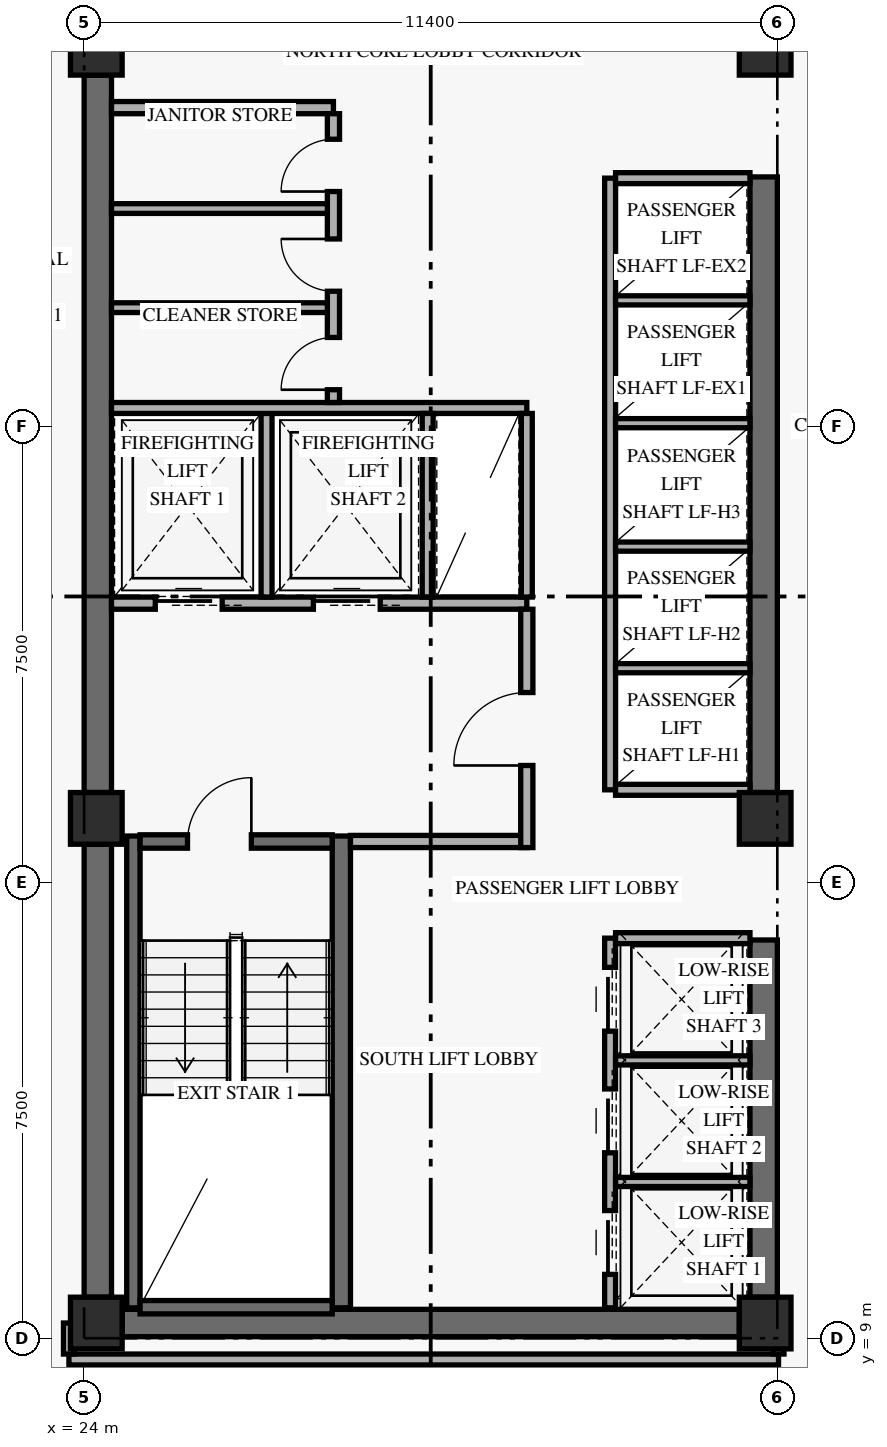
"""IFC4 building model, lengths in metres.
Left out: names, types, materials, properties, quantities, classifications, styles, units other than length and angle.
Written with IfcOpenShell. Run it as: python <this file> out.ifc"""

import sys

from ifc_helpers import new_model, si_unit, direction, frame, frame_2d, origin, origin_2d, place, context, subcontext, project, spatial, rectangle, extrude, element, fill, save


model = new_model("IFC4")
c1 = context("Model", 3, precision=1e-05, world=origin(), true_north=direction((0.0, 1.0)))
c2 = subcontext(c1, "Body", "Model", "MODEL_VIEW")
j1 = project(units=[si_unit("LENGTHUNIT", "METRE"), si_unit("PLANEANGLEUNIT", "RADIAN")], contexts=[c1])
p1 = place(None, origin())
s1 = spatial("IfcSite", under=j1, at=p1, CompositionType="ELEMENT")
p2 = place(p1, origin())
s2 = spatial("IfcBuilding", under=s1, at=p2, CompositionType="ELEMENT")
p3 = place(p2, frame((0.0, 0.0, 80.4)))
s3 = spatial("IfcBuildingStorey", under=s2, at=p3, CompositionType="ELEMENT", Elevation=80.4)
p4 = place(p3, frame((24.225, 9.675, 0.0), z_axis=(0.0, 0.0, 1.0), x_axis=(0.0, 1.0, 0.0)))
e1 = element("IfcWall", 1, at=p4, inside=s3, PredefinedType="SHEAR", context=c2, shape_type="SweptSolid", body=[
    extrude(rectangle(XDim=7.45, YDim=0.45, at=frame_2d((3.725, 0.0))), origin(), (0.0, 0.0, 1.0), 2.749),
])
p5 = place(p3, frame((24.225, 17.975, 0.0), z_axis=(0.0, 0.0, 1.0), x_axis=(0.0, 1.0, 0.0)))
e2 = element("IfcWall", 2, at=p5, inside=s3, PredefinedType="SHEAR", context=c2, shape_type="SweptSolid", body=[
    extrude(rectangle(XDim=11.8, YDim=0.45, at=frame_2d((5.9, 0.0))), origin(), (0.0, 0.0, 1.0), 2.749),
])
p6 = place(p3, frame((35.175, 9.675, 0.0), z_axis=(0.0, 0.0, 1.0), x_axis=(0.0, 1.0, 0.0)))
e3 = element("IfcWall", 3, at=p6, inside=s3, PredefinedType="SHEAR", context=c2, shape_type="SweptSolid", body=[
    extrude(rectangle(XDim=5.875, YDim=0.45, at=frame_2d((2.938, 0.0))), origin(), (0.0, 0.0, 1.0), 2.749),
])
p7 = place(p3, frame((35.175, 17.975, 0.0), z_axis=(0.0, 0.0, 1.0), x_axis=(0.0, 1.0, 0.0)))
e4 = element("IfcWall", 4, at=p7, inside=s3, PredefinedType="SHEAR", context=c2, shape_type="SweptSolid", body=[
    extrude(rectangle(XDim=10.125, YDim=0.45, at=frame_2d((5.062, 0.0))), origin(), (0.0, 0.0, 1.0), 2.749),
])
p8 = place(p3, frame((24.625, 9.25, 0.0), z_axis=(0.0, 0.0, 1.0), x_axis=(1.0, 0.0, 0.0)))
e5 = element("IfcWall", 5, at=p8, inside=s3, PredefinedType="SHEAR", context=c2, shape_type="SweptSolid", body=[
    extrude(rectangle(XDim=10.15, YDim=0.45, at=frame_2d((5.075, 0.0))), origin(), (0.0, 0.0, 1.0), 3.36),
])
p9 = place(p3, frame((24.81, 9.5, 0.0), z_axis=(0.0, 0.0, 1.0), x_axis=(0.0, 1.0, 0.0)))
e6 = element("IfcWall", 6, at=p9, inside=s3, PredefinedType="SHEAR", context=c2, shape_type="SweptSolid", body=[
    extrude(rectangle(XDim=7.76, YDim=0.22, at=frame_2d((3.88, 0.0))), origin(), (0.0, 0.0, 1.0), 3.36),
])
p10 = place(p3, frame((28.23, 9.5, 0.0), z_axis=(0.0, 0.0, 1.0), x_axis=(0.0, 1.0, 0.0)))
e7 = element("IfcWall", 7, at=p10, inside=s3, PredefinedType="SHEAR", context=c2, shape_type="SweptSolid", body=[
    extrude(rectangle(XDim=7.76, YDim=0.3, at=frame_2d((3.88, 0.0))), origin(), (0.0, 0.0, 1.0), 3.36),
])
p11 = place(p3, frame((24.92, 9.51, 0.0), z_axis=(0.0, 0.0, 1.0), x_axis=(1.0, 0.0, 0.0)))
e8 = element("IfcWall", 8, at=p11, inside=s3, PredefinedType="SHEAR", context=c2, shape_type="SweptSolid", body=[
    extrude(rectangle(XDim=3.16, YDim=0.22, at=frame_2d((1.58, 0.0))), origin(), (0.0, 0.0, 1.0), 3.36),
])
p12 = place(p3, frame((24.92, 17.17, 0.0), z_axis=(0.0, 0.0, 1.0), x_axis=(1.0, 0.0, 0.0)))
e9 = element("IfcWall", 9, at=p12, inside=s3, PredefinedType="SHEAR", context=c2, shape_type="SweptSolid", body=[
    extrude(rectangle(XDim=3.16, YDim=0.22, at=frame_2d((1.58, 0.0))), origin(), (0.0, 0.0, 1.0), 3.36),
])
p13 = place(p12, frame((0.78, 0.0, 0.0)))
e10 = element("IfcOpeningElement", 10, at=p13, cuts=e9, PredefinedType="OPENING", context=c2, shape_type="SweptSolid", body=[
    extrude(rectangle(XDim=1.05, YDim=2.15, at=frame_2d((0.525, 1.075))), frame((0.0, 0.12, 0.0), z_axis=(0.0, -1.0, 0.0), x_axis=(1.0, 0.0, 0.0)), (0.0, 0.0, 1.0), 0.24),
])
for number, where, z_axis, x_axis in (
    (11, (24.2, 9.25, 0.0), (0.0, 0.0, 1.0), (1.0, 0.0, 0.0)),
    (12, (24.2, 17.55, 0.0), (0.0, 0.0, 1.0), (1.0, 0.0, 0.0)),
    (13, (24.2, 30.2, 0.0), (0.0, 0.0, 1.0), (1.0, 0.0, 0.0)),
    (14, (35.2, 9.25, 0.0), (0.0, 0.0, 1.0), (1.0, 0.0, 0.0)),
    (15, (35.2, 17.55, 0.0), (0.0, 0.0, 1.0), (1.0, 0.0, 0.0)),
    (16, (35.2, 30.2, 0.0), (0.0, 0.0, 1.0), (1.0, 0.0, 0.0)),
):
    element("IfcColumn", number, at=place(p3, frame(where, z_axis=z_axis, x_axis=x_axis)), inside=s3, PredefinedType="COLUMN", context=c2, shape_type="SweptSolid", body=[
        extrude(rectangle(XDim=0.85, YDim=0.85, at=origin_2d()), origin(), (0.0, 0.0, 1.0), 3.6),
    ])
p14 = place(p3, frame((24.45, 21.09, 0.0), z_axis=(0.0, 0.0, 1.0), x_axis=(1.0, 0.0, 0.0)))
e17 = element("IfcWall", 17, at=p14, inside=s3, PredefinedType="STANDARD", context=c2, shape_type="SweptSolid", body=[
    extrude(rectangle(XDim=6.83, YDim=0.2, at=frame_2d((3.415, 0.0))), origin(), (0.0, 0.0, 1.0), 3.36),
])
p15 = place(p14, frame((0.72, 0.0, 0.0)))
e18 = element("IfcOpeningElement", 18, at=p15, cuts=e17, PredefinedType="OPENING", context=c2, shape_type="SweptSolid", body=[
    extrude(rectangle(XDim=1.1, YDim=2.2, at=frame_2d((0.55, 1.1))), frame((0.0, 0.11, 0.0), z_axis=(0.0, -1.0, 0.0), x_axis=(1.0, 0.0, 0.0)), (0.0, 0.0, 1.0), 0.22),
])
p16 = place(p14, frame((3.32, 0.0, 0.0)))
e19 = element("IfcOpeningElement", 19, at=p16, cuts=e17, PredefinedType="OPENING", context=c2, shape_type="SweptSolid", body=[
    extrude(rectangle(XDim=1.1, YDim=2.2, at=frame_2d((0.55, 1.1))), frame((0.0, 0.11, 0.0), z_axis=(0.0, -1.0, 0.0), x_axis=(1.0, 0.0, 0.0)), (0.0, 0.0, 1.0), 0.22),
])
p17 = place(p3, frame((28.38, 17.17, 0.0), z_axis=(0.0, 0.0, 1.0), x_axis=(1.0, 0.0, 0.0)))
e20 = element("IfcWall", 20, at=p17, inside=s3, PredefinedType="STANDARD", context=c2, shape_type="SweptSolid", body=[
    extrude(rectangle(XDim=2.9, YDim=0.2, at=frame_2d((1.45, 0.0))), origin(), (0.0, 0.0, 1.0), 3.36),
])
p18 = place(p3, frame((31.28, 17.07, 0.0), z_axis=(0.0, 0.0, 1.0), x_axis=(0.0, 1.0, 0.0)))
e21 = element("IfcWall", 21, at=p18, inside=s3, PredefinedType="STANDARD", context=c2, shape_type="SweptSolid", body=[
    extrude(rectangle(XDim=3.92, YDim=0.2, at=frame_2d((1.96, 0.0))), origin(), (0.0, 0.0, 1.0), 2.731),
])
p19 = place(p18, frame((1.35, 0.0, 0.0)))
e22 = element("IfcOpeningElement", 22, at=p19, cuts=e21, PredefinedType="OPENING", context=c2, shape_type="SweptSolid", body=[
    extrude(rectangle(XDim=1.2, YDim=2.15, at=frame_2d((0.6, 1.075))), frame((0.0, 0.11, 0.0), z_axis=(0.0, -1.0, 0.0), x_axis=(1.0, 0.0, 0.0)), (0.0, 0.0, 1.0), 0.22),
])
p20 = place(p3, frame((27.0, 21.19, 0.0), z_axis=(0.0, 0.0, 1.0), x_axis=(0.0, 1.0, 0.0)))
e23 = element("IfcWall", 23, at=p20, inside=s3, PredefinedType="STANDARD", context=c2, shape_type="SweptSolid", body=[
    extrude(rectangle(XDim=3.11, YDim=0.18, at=frame_2d((1.555, 0.0))), origin(), (0.0, 0.0, 1.0), 3.36),
])
p21 = place(p3, frame((24.45, 24.3, 0.0), z_axis=(0.0, 0.0, 1.0), x_axis=(1.0, 0.0, 0.0)))
e24 = element("IfcWall", 24, at=p21, inside=s3, PredefinedType="STANDARD", context=c2, shape_type="SweptSolid", body=[
    extrude(rectangle(XDim=6.83, YDim=0.18, at=frame_2d((3.415, 0.0))), origin(), (0.0, 0.0, 1.0), 3.36),
])
for number, where, z_axis, x_axis in (
    (25, (29.65, 21.19, 0.0), (0.0, 0.0, 1.0), (0.0, 1.0, 0.0)),
    (26, (31.28, 21.19, 0.0), (0.0, 0.0, 1.0), (0.0, 1.0, 0.0)),
):
    element("IfcWall", number, at=place(p3, frame(where, z_axis=z_axis, x_axis=x_axis)), inside=s3, PredefinedType="STANDARD", context=c2, shape_type="SweptSolid", body=[
        extrude(rectangle(XDim=3.02, YDim=0.18, at=frame_2d((1.51, 0.0))), origin(), (0.0, 0.0, 1.0), 3.36),
    ])
p22 = place(p3, frame((24.45, 29.24, 0.0), z_axis=(0.0, 0.0, 1.0), x_axis=(1.0, 0.0, 0.0)))
e27 = element("IfcWall", 27, at=p22, inside=s3, PredefinedType="STANDARD", context=c2, shape_type="SweptSolid", body=[
    extrude(rectangle(XDim=3.65, YDim=0.2, at=frame_2d((1.825, 0.0))), origin(), (0.0, 0.0, 1.0), 3.36),
])
p23 = place(p3, frame((28.1, 24.39, 0.0), z_axis=(0.0, 0.0, 1.0), x_axis=(0.0, 1.0, 0.0)))
e28 = element("IfcWall", 28, at=p23, inside=s3, PredefinedType="STANDARD", context=c2, shape_type="SweptSolid", body=[
    extrude(rectangle(XDim=4.75, YDim=0.2, at=frame_2d((2.375, 0.0))), origin(), (0.0, 0.0, 1.0), 3.36),
])
p24 = place(p23, frame((0.21, 0.0, 0.0)))
e29 = element("IfcOpeningElement", 29, at=p24, cuts=e28, PredefinedType="OPENING", context=c2, shape_type="SweptSolid", body=[
    extrude(rectangle(XDim=0.86, YDim=2.1, at=frame_2d((0.43, 1.05))), frame((0.0, 0.11, 0.0), z_axis=(0.0, -1.0, 0.0), x_axis=(1.0, 0.0, 0.0)), (0.0, 0.0, 1.0), 0.22),
])
p25 = place(p23, frame((1.83, 0.0, 0.0)))
e30 = element("IfcOpeningElement", 30, at=p25, cuts=e28, PredefinedType="OPENING", context=c2, shape_type="SweptSolid", body=[
    extrude(rectangle(XDim=0.86, YDim=2.1, at=frame_2d((0.43, 1.05))), frame((0.0, 0.11, 0.0), z_axis=(0.0, -1.0, 0.0), x_axis=(1.0, 0.0, 0.0)), (0.0, 0.0, 1.0), 0.22),
])
p26 = place(p23, frame((3.47, 0.0, 0.0)))
e31 = element("IfcOpeningElement", 31, at=p26, cuts=e28, PredefinedType="OPENING", context=c2, shape_type="SweptSolid", body=[
    extrude(rectangle(XDim=0.86, YDim=2.1, at=frame_2d((0.43, 1.05))), frame((0.0, 0.11, 0.0), z_axis=(0.0, -1.0, 0.0), x_axis=(1.0, 0.0, 0.0)), (0.0, 0.0, 1.0), 0.22),
])
for number, where, z_axis, x_axis in (
    (32, (24.45, 25.95, 0.0), (0.0, 0.0, 1.0), (1.0, 0.0, 0.0)),
    (33, (24.45, 27.58, 0.0), (0.0, 0.0, 1.0), (1.0, 0.0, 0.0)),
):
    element("IfcWall", number, at=place(p3, frame(where, z_axis=z_axis, x_axis=x_axis)), inside=s3, PredefinedType="PARTITIONING", context=c2, shape_type="SweptSolid", body=[
        extrude(rectangle(XDim=3.55, YDim=0.16, at=frame_2d((1.775, 0.0))), origin(), (0.0, 0.0, 1.0), 3.36),
    ])
p27 = place(p3, frame((32.65, 9.5, 0.0), z_axis=(0.0, 0.0, 1.0), x_axis=(0.0, 1.0, 0.0)))
e34 = element("IfcWall", 34, at=p27, inside=s3, PredefinedType="STANDARD", context=c2, shape_type="SweptSolid", body=[
    extrude(rectangle(XDim=6.08, YDim=0.18, at=frame_2d((3.04, 0.0))), origin(), (0.0, 0.0, 1.0), 3.36),
])
p28 = place(p27, frame((0.55, 0.0, 0.0)))
e35 = element("IfcOpeningElement", 35, at=p28, cuts=e34, PredefinedType="OPENING", context=c2, shape_type="SweptSolid", body=[
    extrude(rectangle(XDim=1.05, YDim=2.2, at=frame_2d((0.525, 1.1))), frame((0.0, 0.1, 0.0), z_axis=(0.0, -1.0, 0.0), x_axis=(1.0, 0.0, 0.0)), (0.0, 0.0, 1.0), 0.2),
])
p29 = place(p27, frame((2.55, 0.0, 0.0)))
e36 = element("IfcOpeningElement", 36, at=p29, cuts=e34, PredefinedType="OPENING", context=c2, shape_type="SweptSolid", body=[
    extrude(rectangle(XDim=1.05, YDim=2.2, at=frame_2d((0.525, 1.1))), frame((0.0, 0.1, 0.0), z_axis=(0.0, -1.0, 0.0), x_axis=(1.0, 0.0, 0.0)), (0.0, 0.0, 1.0), 0.2),
])
p30 = place(p27, frame((4.55, 0.0, 0.0)))
e37 = element("IfcOpeningElement", 37, at=p30, cuts=e34, PredefinedType="OPENING", context=c2, shape_type="SweptSolid", body=[
    extrude(rectangle(XDim=1.05, YDim=2.2, at=frame_2d((0.525, 1.1))), frame((0.0, 0.1, 0.0), z_axis=(0.0, -1.0, 0.0), x_axis=(1.0, 0.0, 0.0)), (0.0, 0.0, 1.0), 0.2),
])
p31 = place(p3, frame((32.74, 15.58, 0.0), z_axis=(0.0, 0.0, 1.0), x_axis=(1.0, 0.0, 0.0)))
e38 = element("IfcWall", 38, at=p31, inside=s3, PredefinedType="STANDARD", context=c2, shape_type="SweptSolid", body=[
    extrude(rectangle(XDim=2.21, YDim=0.18, at=frame_2d((1.105, 0.0))), origin(), (0.0, 0.0, 1.0), 3.36),
])
for number, where, z_axis, x_axis in (
    (39, (32.74, 11.57, 0.0), (0.0, 0.0, 1.0), (1.0, 0.0, 0.0)),
    (40, (32.74, 13.57, 0.0), (0.0, 0.0, 1.0), (1.0, 0.0, 0.0)),
):
    element("IfcWall", number, at=place(p3, frame(where, z_axis=z_axis, x_axis=x_axis)), inside=s3, PredefinedType="STANDARD", context=c2, shape_type="SweptSolid", body=[
        extrude(rectangle(XDim=2.21, YDim=0.15, at=frame_2d((1.105, 0.0))), origin(), (0.0, 0.0, 1.0), 3.36),
    ])
p32 = place(p3, frame((32.65, 18.02, 0.0), z_axis=(0.0, 0.0, 1.0), x_axis=(0.0, 1.0, 0.0)))
e41 = element("IfcWall", 41, at=p32, inside=s3, PredefinedType="STANDARD", context=c2, shape_type="SweptSolid", body=[
    extrude(rectangle(XDim=10.06, YDim=0.18, at=frame_2d((5.03, 0.0))), origin(), (0.0, 0.0, 1.0), 3.36),
])
for number, where, z_axis, x_axis in (
    (42, (32.74, 18.02, 0.0), (0.0, 0.0, 1.0), (1.0, 0.0, 0.0)),
    (43, (32.74, 28.08, 0.0), (0.0, 0.0, 1.0), (1.0, 0.0, 0.0)),
):
    element("IfcWall", number, at=place(p3, frame(where, z_axis=z_axis, x_axis=x_axis)), inside=s3, PredefinedType="STANDARD", context=c2, shape_type="SweptSolid", body=[
        extrude(rectangle(XDim=2.21, YDim=0.18, at=frame_2d((1.105, 0.0))), origin(), (0.0, 0.0, 1.0), 3.36),
    ])
for number, where, z_axis, x_axis in (
    (44, (32.74, 20.02, 0.0), (0.0, 0.0, 1.0), (1.0, 0.0, 0.0)),
    (45, (32.74, 22.02, 0.0), (0.0, 0.0, 1.0), (1.0, 0.0, 0.0)),
    (46, (32.74, 24.05, 0.0), (0.0, 0.0, 1.0), (1.0, 0.0, 0.0)),
    (47, (32.74, 26.07, 0.0), (0.0, 0.0, 1.0), (1.0, 0.0, 0.0)),
):
    element("IfcWall", number, at=place(p3, frame(where, z_axis=z_axis, x_axis=x_axis)), inside=s3, PredefinedType="STANDARD", context=c2, shape_type="SweptSolid", body=[
        extrude(rectangle(XDim=2.21, YDim=0.15, at=frame_2d((1.105, 0.0))), origin(), (0.0, 0.0, 1.0), 3.36),
    ])
p33 = place(p3, frame((23.75, 8.65, 0.0), z_axis=(0.0, 0.0, 1.0), x_axis=(1.0, 0.0, 0.0)))
e48 = element("IfcWall", 48, at=p33, inside=s3, PredefinedType="STANDARD", context=c2, shape_type="SweptSolid", body=[
    extrude(rectangle(XDim=11.67, YDim=0.18, at=frame_2d((5.835, 0.0))), origin(), (0.0, 0.0, 1.0), 2.731),
])
for number, where, z_axis, x_axis in (
    (49, (35.42, 8.74, 0.0), (0.0, 0.0, 1.0), (0.0, 1.0, 0.0)),
    (50, (23.75, 8.74, 0.0), (0.0, 0.0, 1.0), (0.0, 1.0, 0.0)),
):
    element("IfcWall", number, at=place(p3, frame(where, z_axis=z_axis, x_axis=x_axis)), inside=s3, PredefinedType="STANDARD", context=c2, shape_type="SweptSolid", body=[
        extrude(rectangle(XDim=0.51, YDim=0.18, at=frame_2d((0.255, 0.0))), origin(), (0.0, 0.0, 1.0), 2.731),
    ])
p34 = place(p13, frame((1.05, 0.0, 0.0), z_axis=(0.0, 0.0, 1.0), x_axis=(-1.0, 0.0, 0.0)))
e51 = element("IfcDoor", 51, at=p34, inside=s3, OperationType="SINGLE_SWING_LEFT", PredefinedType="DOOR", context=c2, shape_type="SweptSolid", body=[
    extrude(rectangle(XDim=1.05, YDim=2.15, at=frame_2d((0.525, 1.075))), frame((0.0, 0.025, 0.0), z_axis=(0.0, -1.0, 0.0), x_axis=(1.0, 0.0, 0.0)), (0.0, 0.0, 1.0), 0.05),
])
fill(e10, e51)
p35 = place(p15, origin())
e52 = element("IfcDoor", 52, at=p35, inside=s3, OperationType="SLIDING_TO_LEFT", PredefinedType="DOOR", context=c2, shape_type="SweptSolid", body=[
    extrude(rectangle(XDim=1.1, YDim=2.2, at=frame_2d((0.55, 1.1))), frame((0.0, 0.025, 0.0), z_axis=(0.0, -1.0, 0.0), x_axis=(1.0, 0.0, 0.0)), (0.0, 0.0, 1.0), 0.05),
])
fill(e18, e52)
p36 = place(p16, origin())
e53 = element("IfcDoor", 53, at=p36, inside=s3, OperationType="SLIDING_TO_LEFT", PredefinedType="DOOR", context=c2, shape_type="SweptSolid", body=[
    extrude(rectangle(XDim=1.1, YDim=2.2, at=frame_2d((0.55, 1.1))), frame((0.0, 0.025, 0.0), z_axis=(0.0, -1.0, 0.0), x_axis=(1.0, 0.0, 0.0)), (0.0, 0.0, 1.0), 0.05),
])
fill(e19, e53)
p37 = place(p19, origin())
e54 = element("IfcDoor", 54, at=p37, inside=s3, OperationType="SINGLE_SWING_LEFT", PredefinedType="DOOR", context=c2, shape_type="SweptSolid", body=[
    extrude(rectangle(XDim=1.2, YDim=2.15, at=frame_2d((0.6, 1.075))), frame((0.0, 0.025, 0.0), z_axis=(0.0, -1.0, 0.0), x_axis=(1.0, 0.0, 0.0)), (0.0, 0.0, 1.0), 0.05),
])
fill(e22, e54)
p38 = place(p24, origin())
e55 = element("IfcDoor", 55, at=p38, inside=s3, OperationType="SINGLE_SWING_LEFT", PredefinedType="DOOR", context=c2, shape_type="SweptSolid", body=[
    extrude(rectangle(XDim=0.86, YDim=2.1, at=frame_2d((0.43, 1.05))), frame((0.0, 0.025, 0.0), z_axis=(0.0, -1.0, 0.0), x_axis=(1.0, 0.0, 0.0)), (0.0, 0.0, 1.0), 0.05),
])
fill(e29, e55)
p39 = place(p25, origin())
e56 = element("IfcDoor", 56, at=p39, inside=s3, OperationType="SINGLE_SWING_RIGHT", PredefinedType="DOOR", context=c2, shape_type="SweptSolid", body=[
    extrude(rectangle(XDim=0.86, YDim=2.1, at=frame_2d((0.43, 1.05))), frame((0.0, 0.025, 0.0), z_axis=(0.0, -1.0, 0.0), x_axis=(1.0, 0.0, 0.0)), (0.0, 0.0, 1.0), 0.05),
])
fill(e30, e56)
p40 = place(p26, origin())
e57 = element("IfcDoor", 57, at=p40, inside=s3, OperationType="SINGLE_SWING_LEFT", PredefinedType="DOOR", context=c2, shape_type="SweptSolid", body=[
    extrude(rectangle(XDim=0.86, YDim=2.1, at=frame_2d((0.43, 1.05))), frame((0.0, 0.025, 0.0), z_axis=(0.0, -1.0, 0.0), x_axis=(1.0, 0.0, 0.0)), (0.0, 0.0, 1.0), 0.05),
])
fill(e31, e57)
p41 = place(p28, origin())
e58 = element("IfcDoor", 58, at=p41, inside=s3, OperationType="SLIDING_TO_LEFT", PredefinedType="DOOR", context=c2, shape_type="SweptSolid", body=[
    extrude(rectangle(XDim=1.05, YDim=2.2, at=frame_2d((0.525, 1.1))), frame((0.0, 0.025, 0.0), z_axis=(0.0, -1.0, 0.0), x_axis=(1.0, 0.0, 0.0)), (0.0, 0.0, 1.0), 0.05),
])
fill(e35, e58)
p42 = place(p29, origin())
e59 = element("IfcDoor", 59, at=p42, inside=s3, OperationType="SLIDING_TO_LEFT", PredefinedType="DOOR", context=c2, shape_type="SweptSolid", body=[
    extrude(rectangle(XDim=1.05, YDim=2.2, at=frame_2d((0.525, 1.1))), frame((0.0, 0.025, 0.0), z_axis=(0.0, -1.0, 0.0), x_axis=(1.0, 0.0, 0.0)), (0.0, 0.0, 1.0), 0.05),
])
fill(e36, e59)
p43 = place(p30, origin())
e60 = element("IfcDoor", 60, at=p43, inside=s3, OperationType="SLIDING_TO_LEFT", PredefinedType="DOOR", context=c2, shape_type="SweptSolid", body=[
    extrude(rectangle(XDim=1.05, YDim=2.2, at=frame_2d((0.525, 1.1))), frame((0.0, 0.025, 0.0), z_axis=(0.0, -1.0, 0.0), x_axis=(1.0, 0.0, 0.0)), (0.0, 0.0, 1.0), 0.05),
])
fill(e37, e60)
save(model, sys.argv[1])
